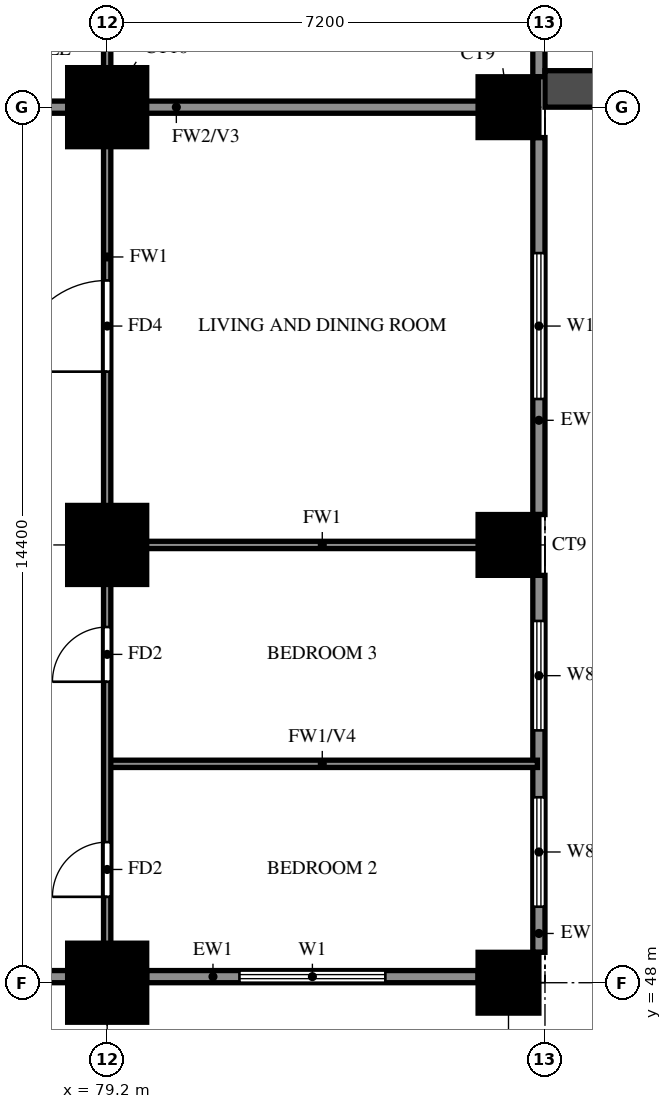
"""IFC4 building model, lengths in metres.
Left out: names, types, materials, properties, quantities, classifications, styles, units other than length and angle.
Written with IfcOpenShell. Run it as: python <this file> out.ifc"""

import sys

from ifc_helpers import new_model, si_unit, direction, frame, frame_2d, origin, origin_2d, place, context, subcontext, project, spatial, rectangle, extrude, source, transform, mapped, element, fill, save


model = new_model("IFC4")
c1 = context("Model", 3, precision=1e-05, world=origin(), true_north=direction((0.0, 1.0)))
c2 = subcontext(c1, "Body", "Model", "MODEL_VIEW")
j1 = project(units=[si_unit("LENGTHUNIT", "METRE"), si_unit("PLANEANGLEUNIT", "RADIAN")], contexts=[c1])
p1 = place(None, origin())
s1 = spatial("IfcSite", under=j1, at=p1, CompositionType="ELEMENT")
p2 = place(p1, origin())
s2 = spatial("IfcBuilding", under=s1, at=p2, CompositionType="ELEMENT")
p3 = place(p2, frame((0.0, 0.0, 62.0)))
s3 = spatial("IfcBuildingStorey", under=s2, at=p3, CompositionType="ELEMENT", Elevation=62.0)
m1 = source(origin(), c2, "Body", "SweptSolid", [
    extrude(rectangle(XDim=1.3, YDim=1.3, at=origin_2d()), origin(), (0.0, 0.0, 1.0), 3.18),
])
p4 = place(p3, frame((79.2, 48.0, 0.0), z_axis=(0.0, 0.0, 1.0), x_axis=(1.0, 0.0, 0.0)))
e1 = element("IfcColumn", 1, at=p4, inside=s3, PredefinedType="COLUMN", context=c2, shape_type="MappedRepresentation", body=[
    mapped(m1, transform((0.0, 0.0, 0.0))),
])
m2 = source(origin(), c2, "Body", "SweptSolid", [
    extrude(rectangle(XDim=1.0, YDim=1.0, at=origin_2d()), origin(), (0.0, 0.0, 1.0), 3.18),
])
p5 = place(p3, frame((85.8, 48.0, 0.0), z_axis=(0.0, 0.0, 1.0), x_axis=(1.0, 0.0, 0.0)))
e2 = element("IfcColumn", 2, at=p5, inside=s3, PredefinedType="COLUMN", context=c2, shape_type="MappedRepresentation", body=[
    mapped(m2, transform((0.0, 0.0, 0.0))),
])
p6 = place(p3, frame((79.2, 55.2, 0.0), z_axis=(0.0, 0.0, 1.0), x_axis=(1.0, 0.0, 0.0)))
e3 = element("IfcColumn", 3, at=p6, inside=s3, PredefinedType="COLUMN", context=c2, shape_type="MappedRepresentation", body=[
    mapped(m1, transform((0.0, 0.0, 0.0))),
])
p7 = place(p3, frame((85.8, 55.2, 0.0), z_axis=(0.0, 0.0, 1.0), x_axis=(1.0, 0.0, 0.0)))
e4 = element("IfcColumn", 4, at=p7, inside=s3, PredefinedType="COLUMN", context=c2, shape_type="MappedRepresentation", body=[
    mapped(m2, transform((0.0, 0.0, 0.0))),
])
p8 = place(p3, frame((79.2, 62.4, 0.0), z_axis=(0.0, 0.0, 1.0), x_axis=(1.0, 0.0, 0.0)))
e5 = element("IfcColumn", 5, at=p8, inside=s3, PredefinedType="COLUMN", context=c2, shape_type="MappedRepresentation", body=[
    mapped(m1, transform((0.0, 0.0, 0.0))),
])
p9 = place(p3, frame((85.8, 62.4, 0.0), z_axis=(0.0, 0.0, 1.0), x_axis=(1.0, 0.0, 0.0)))
e6 = element("IfcColumn", 6, at=p9, inside=s3, PredefinedType="COLUMN", context=c2, shape_type="MappedRepresentation", body=[
    mapped(m2, transform((0.0, 0.0, 0.0))),
])
p10 = place(p3, frame((85.996, 33.863, 0.0), z_axis=(0.0, 0.0, 1.0), x_axis=(-0.707100718496, 0.707112843825, 0.0)))
e7 = element("IfcWall", 7, at=p10, inside=s3, PredefinedType="SOLIDWALL", context=c2, shape_type="SweptSolid", body=[
    extrude(rectangle(XDim=20.135, YDim=0.2, at=frame_2d((10.067, 0.0))), origin(), (0.0, 0.0, 1.0), 3.18),
])
p11 = place(p3, frame((71.989, 48.1, 0.0), z_axis=(0.0, 0.0, 1.0), x_axis=(1.0, 0.0, 0.0)))
e8 = element("IfcWall", 8, at=p11, inside=s3, PredefinedType="SOLIDWALL", context=c2, shape_type="SweptSolid", body=[
    extrude(rectangle(XDim=6.562, YDim=0.2, at=frame_2d((3.281, 0.0))), origin(), (0.0, 0.0, 1.0), 3.18),
])
p12 = place(p3, frame((79.85, 48.1, 0.0), z_axis=(0.0, 0.0, 1.0), x_axis=(1.0, 0.0, 0.0)))
e9 = element("IfcWall", 9, at=p12, inside=s3, PredefinedType="SOLIDWALL", context=c2, shape_type="SweptSolid", body=[
    extrude(rectangle(XDim=5.45, YDim=0.2, at=frame_2d((2.725, 0.0))), origin(), (0.0, 0.0, 1.0), 3.18),
])
p13 = place(p12, frame((1.525, 0.0, 0.6)))
e10 = element("IfcOpeningElement", 10, at=p13, cuts=e9, PredefinedType="OPENING", context=c2, shape_type="SweptSolid", body=[
    extrude(rectangle(XDim=2.4, YDim=2.4, at=frame_2d((1.2, 1.2))), frame((0.0, 0.11, 0.0), z_axis=(0.0, -1.0, 0.0), x_axis=(1.0, 0.0, 0.0)), (0.0, 0.0, 1.0), 0.22),
])
p14 = place(p3, frame((86.3, 48.5, 0.0), z_axis=(0.0, 0.0, 1.0), x_axis=(0.0, 1.0, 0.0)))
e11 = element("IfcWall", 11, at=p14, inside=s3, PredefinedType="SOLIDWALL", context=c2, shape_type="SweptSolid", body=[
    extrude(rectangle(XDim=6.2, YDim=0.2, at=frame_2d((3.1, 0.0))), origin(), (0.0, 0.0, 1.0), 3.18),
])
p15 = place(p14, frame((0.75, 0.0, 0.6)))
e12 = element("IfcOpeningElement", 12, at=p15, cuts=e11, PredefinedType="OPENING", context=c2, shape_type="SweptSolid", body=[
    extrude(rectangle(XDim=1.8, YDim=2.4, at=frame_2d((0.9, 1.2))), frame((0.0, 0.11, 0.0), z_axis=(0.0, -1.0, 0.0), x_axis=(1.0, 0.0, 0.0)), (0.0, 0.0, 1.0), 0.22),
])
p16 = place(p14, frame((3.65, 0.0, 0.6)))
e13 = element("IfcOpeningElement", 13, at=p16, cuts=e11, PredefinedType="OPENING", context=c2, shape_type="SweptSolid", body=[
    extrude(rectangle(XDim=1.8, YDim=2.4, at=frame_2d((0.9, 1.2))), frame((0.0, 0.11, 0.0), z_axis=(0.0, -1.0, 0.0), x_axis=(1.0, 0.0, 0.0)), (0.0, 0.0, 1.0), 0.22),
])
p17 = place(p3, frame((86.3, 55.7, 0.0), z_axis=(0.0, 0.0, 1.0), x_axis=(0.0, 1.0, 0.0)))
e14 = element("IfcWall", 14, at=p17, inside=s3, PredefinedType="SOLIDWALL", context=c2, shape_type="SweptSolid", body=[
    extrude(rectangle(XDim=6.2, YDim=0.2, at=frame_2d((3.1, 0.0))), origin(), (0.0, 0.0, 1.0), 3.18),
])
p18 = place(p17, frame((1.9, 0.0, 0.6)))
e15 = element("IfcOpeningElement", 15, at=p18, cuts=e14, PredefinedType="OPENING", context=c2, shape_type="SweptSolid", body=[
    extrude(rectangle(XDim=2.4, YDim=2.4, at=frame_2d((1.2, 1.2))), frame((0.0, 0.11, 0.0), z_axis=(0.0, -1.0, 0.0), x_axis=(1.0, 0.0, 0.0)), (0.0, 0.0, 1.0), 0.22),
])
p19 = place(p3, frame((86.3, 62.9, 0.0), z_axis=(0.0, 0.0, 1.0), x_axis=(0.0, 1.0, 0.0)))
e16 = element("IfcWall", 16, at=p19, inside=s3, PredefinedType="SOLIDWALL", context=c2, shape_type="SweptSolid", body=[
    extrude(rectangle(XDim=6.2, YDim=0.2, at=frame_2d((3.1, 0.0))), origin(), (0.0, 0.0, 1.0), 3.18),
])
p20 = place(p19, frame((1.0, 0.0, 0.0)))
e17 = element("IfcOpeningElement", 17, at=p20, cuts=e16, PredefinedType="OPENING", context=c2, shape_type="SweptSolid", body=[
    extrude(rectangle(XDim=1.8, YDim=2.4, at=frame_2d((0.9, 1.2))), frame((0.0, 0.11, 0.0), z_axis=(0.0, -1.0, 0.0), x_axis=(1.0, 0.0, 0.0)), (0.0, 0.0, 1.0), 0.22),
])
p21 = place(p19, frame((3.65, 0.0, 0.6)))
e18 = element("IfcOpeningElement", 18, at=p21, cuts=e16, PredefinedType="OPENING", context=c2, shape_type="SweptSolid", body=[
    extrude(rectangle(XDim=1.8, YDim=2.4, at=frame_2d((0.9, 1.2))), frame((0.0, 0.11, 0.0), z_axis=(0.0, -1.0, 0.0), x_axis=(1.0, 0.0, 0.0)), (0.0, 0.0, 1.0), 0.22),
])
p22 = place(p3, frame((86.4, 62.7, 0.0), z_axis=(0.0, 0.0, 1.0), x_axis=(1.0, 0.0, 0.0)))
e19 = element("IfcWall", 19, at=p22, inside=s3, PredefinedType="SOLIDWALL", context=c2, shape_type="SweptSolid", body=[
    extrude(rectangle(XDim=2.7, YDim=0.6, at=frame_2d((1.35, 0.0))), origin(), (0.0, 0.0, 1.0), 2.85),
])
p23 = place(p3, frame((74.4, 62.4, 0.0), z_axis=(0.0, 0.0, 1.0), x_axis=(1.0, 0.0, 0.0)))
e20 = element("IfcWall", 20, at=p23, inside=s3, PredefinedType="SOLIDWALL", context=c2, shape_type="SweptSolid", body=[
    extrude(rectangle(XDim=11.875, YDim=0.2, at=frame_2d((5.938, 0.0))), origin(), (0.0, 0.0, 1.0), 3.18),
])
p24 = place(p3, frame((79.2, 51.6, 0.0), z_axis=(0.0, 0.0, 1.0), x_axis=(1.0, 0.0, 0.0)))
e21 = element("IfcWall", 21, at=p24, inside=s3, PredefinedType="PARTITIONING", context=c2, shape_type="SweptSolid", body=[
    extrude(rectangle(XDim=7.075, YDim=0.12, at=frame_2d((3.538, 0.0))), origin(), (0.0, 0.0, 1.0), 2.28),
])
p25 = place(p3, frame((79.2, 55.2, 0.0), z_axis=(0.0, 0.0, 1.0), x_axis=(1.0, 0.0, 0.0)))
e22 = element("IfcWall", 22, at=p25, inside=s3, PredefinedType="PARTITIONING", context=c2, shape_type="SweptSolid", body=[
    extrude(rectangle(XDim=7.075, YDim=0.12, at=frame_2d((3.538, 0.0))), origin(), (0.0, 0.0, 1.0), 3.18),
])
p26 = place(p3, frame((79.2, 48.125, 0.0), z_axis=(0.0, 0.0, 1.0), x_axis=(0.0, 1.0, 0.0)))
e23 = element("IfcWall", 23, at=p26, inside=s3, PredefinedType="PARTITIONING", context=c2, shape_type="SweptSolid", body=[
    extrude(rectangle(XDim=21.475, YDim=0.12, at=frame_2d((10.738, 0.0))), origin(), (0.0, 0.0, 1.0), 3.18),
])
p27 = place(p26, frame((1.288, 0.0, 0.0)))
e24 = element("IfcOpeningElement", 24, at=p27, cuts=e23, PredefinedType="OPENING", context=c2, shape_type="SweptSolid", body=[
    extrude(rectangle(XDim=0.9, YDim=2.1, at=frame_2d((0.45, 1.05))), frame((0.0, 0.07, 0.0), z_axis=(0.0, -1.0, 0.0), x_axis=(1.0, 0.0, 0.0)), (0.0, 0.0, 1.0), 0.14),
])
p28 = place(p26, frame((4.825, 0.0, 0.0)))
e25 = element("IfcOpeningElement", 25, at=p28, cuts=e23, PredefinedType="OPENING", context=c2, shape_type="SweptSolid", body=[
    extrude(rectangle(XDim=0.9, YDim=2.1, at=frame_2d((0.45, 1.05))), frame((0.0, 0.07, 0.0), z_axis=(0.0, -1.0, 0.0), x_axis=(1.0, 0.0, 0.0)), (0.0, 0.0, 1.0), 0.14),
])
p29 = place(p26, frame((9.925, 0.0, 0.0)))
e26 = element("IfcOpeningElement", 26, at=p29, cuts=e23, PredefinedType="OPENING", context=c2, shape_type="SweptSolid", body=[
    extrude(rectangle(XDim=1.5, YDim=2.1, at=frame_2d((0.75, 1.05))), frame((0.0, 0.07, 0.0), z_axis=(0.0, -1.0, 0.0), x_axis=(1.0, 0.0, 0.0)), (0.0, 0.0, 1.0), 0.14),
])
p30 = place(p26, frame((15.625, 0.0, 0.0)))
e27 = element("IfcOpeningElement", 27, at=p30, cuts=e23, PredefinedType="OPENING", context=c2, shape_type="SweptSolid", body=[
    extrude(rectangle(XDim=0.9, YDim=2.1, at=frame_2d((0.45, 1.05))), frame((0.0, 0.07, 0.0), z_axis=(0.0, -1.0, 0.0), x_axis=(1.0, 0.0, 0.0)), (0.0, 0.0, 1.0), 0.14),
])
p31 = place(p26, frame((19.225, 0.0, 0.0)))
e28 = element("IfcOpeningElement", 28, at=p31, cuts=e23, PredefinedType="OPENING", context=c2, shape_type="SweptSolid", body=[
    extrude(rectangle(XDim=0.9, YDim=2.1, at=frame_2d((0.45, 1.05))), frame((0.0, 0.07, 0.0), z_axis=(0.0, -1.0, 0.0), x_axis=(1.0, 0.0, 0.0)), (0.0, 0.0, 1.0), 0.14),
])
p32 = place(p13, origin())
e29 = element("IfcWindow", 29, at=p32, inside=s3, PartitioningType="DOUBLE_PANEL_VERTICAL", PredefinedType="WINDOW", context=c2, shape_type="SweptSolid", body=[
    extrude(rectangle(XDim=2.4, YDim=2.4, at=frame_2d((1.2, 1.2))), frame((0.0, 0.03, 0.0), z_axis=(0.0, -1.0, 0.0), x_axis=(1.0, 0.0, 0.0)), (0.0, 0.0, 1.0), 0.06),
])
fill(e10, e29)
p33 = place(p15, origin())
e30 = element("IfcWindow", 30, at=p33, inside=s3, PartitioningType="DOUBLE_PANEL_VERTICAL", PredefinedType="WINDOW", context=c2, shape_type="SweptSolid", body=[
    extrude(rectangle(XDim=1.8, YDim=2.4, at=frame_2d((0.9, 1.2))), frame((0.0, 0.03, 0.0), z_axis=(0.0, -1.0, 0.0), x_axis=(1.0, 0.0, 0.0)), (0.0, 0.0, 1.0), 0.06),
])
fill(e12, e30)
p34 = place(p16, origin())
e31 = element("IfcWindow", 31, at=p34, inside=s3, PartitioningType="DOUBLE_PANEL_VERTICAL", PredefinedType="WINDOW", context=c2, shape_type="SweptSolid", body=[
    extrude(rectangle(XDim=1.8, YDim=2.4, at=frame_2d((0.9, 1.2))), frame((0.0, 0.03, 0.0), z_axis=(0.0, -1.0, 0.0), x_axis=(1.0, 0.0, 0.0)), (0.0, 0.0, 1.0), 0.06),
])
fill(e13, e31)
p35 = place(p18, origin())
e32 = element("IfcWindow", 32, at=p35, inside=s3, PartitioningType="DOUBLE_PANEL_VERTICAL", PredefinedType="WINDOW", context=c2, shape_type="SweptSolid", body=[
    extrude(rectangle(XDim=2.4, YDim=2.4, at=frame_2d((1.2, 1.2))), frame((0.0, 0.03, 0.0), z_axis=(0.0, -1.0, 0.0), x_axis=(1.0, 0.0, 0.0)), (0.0, 0.0, 1.0), 0.06),
])
fill(e15, e32)
p36 = place(p27, origin())
e33 = element("IfcDoor", 33, at=p36, inside=s3, OperationType="SINGLE_SWING_LEFT", PredefinedType="DOOR", context=c2, shape_type="SweptSolid", body=[
    extrude(rectangle(XDim=0.9, YDim=2.1, at=frame_2d((0.45, 1.05))), frame((0.0, 0.025, 0.0), z_axis=(0.0, -1.0, 0.0), x_axis=(1.0, 0.0, 0.0)), (0.0, 0.0, 1.0), 0.05),
])
fill(e24, e33)
p37 = place(p28, origin())
e34 = element("IfcDoor", 34, at=p37, inside=s3, OperationType="SINGLE_SWING_RIGHT", PredefinedType="DOOR", context=c2, shape_type="SweptSolid", body=[
    extrude(rectangle(XDim=0.9, YDim=2.1, at=frame_2d((0.45, 1.05))), frame((0.0, 0.025, 0.0), z_axis=(0.0, -1.0, 0.0), x_axis=(1.0, 0.0, 0.0)), (0.0, 0.0, 1.0), 0.05),
])
fill(e25, e34)
p38 = place(p29, origin())
e35 = element("IfcDoor", 35, at=p38, inside=s3, OperationType="SINGLE_SWING_LEFT", PredefinedType="DOOR", context=c2, shape_type="SweptSolid", body=[
    extrude(rectangle(XDim=1.5, YDim=2.1, at=frame_2d((0.75, 1.05))), frame((0.0, 0.025, 0.0), z_axis=(0.0, -1.0, 0.0), x_axis=(1.0, 0.0, 0.0)), (0.0, 0.0, 1.0), 0.05),
])
fill(e26, e35)
save(model, sys.argv[1])
